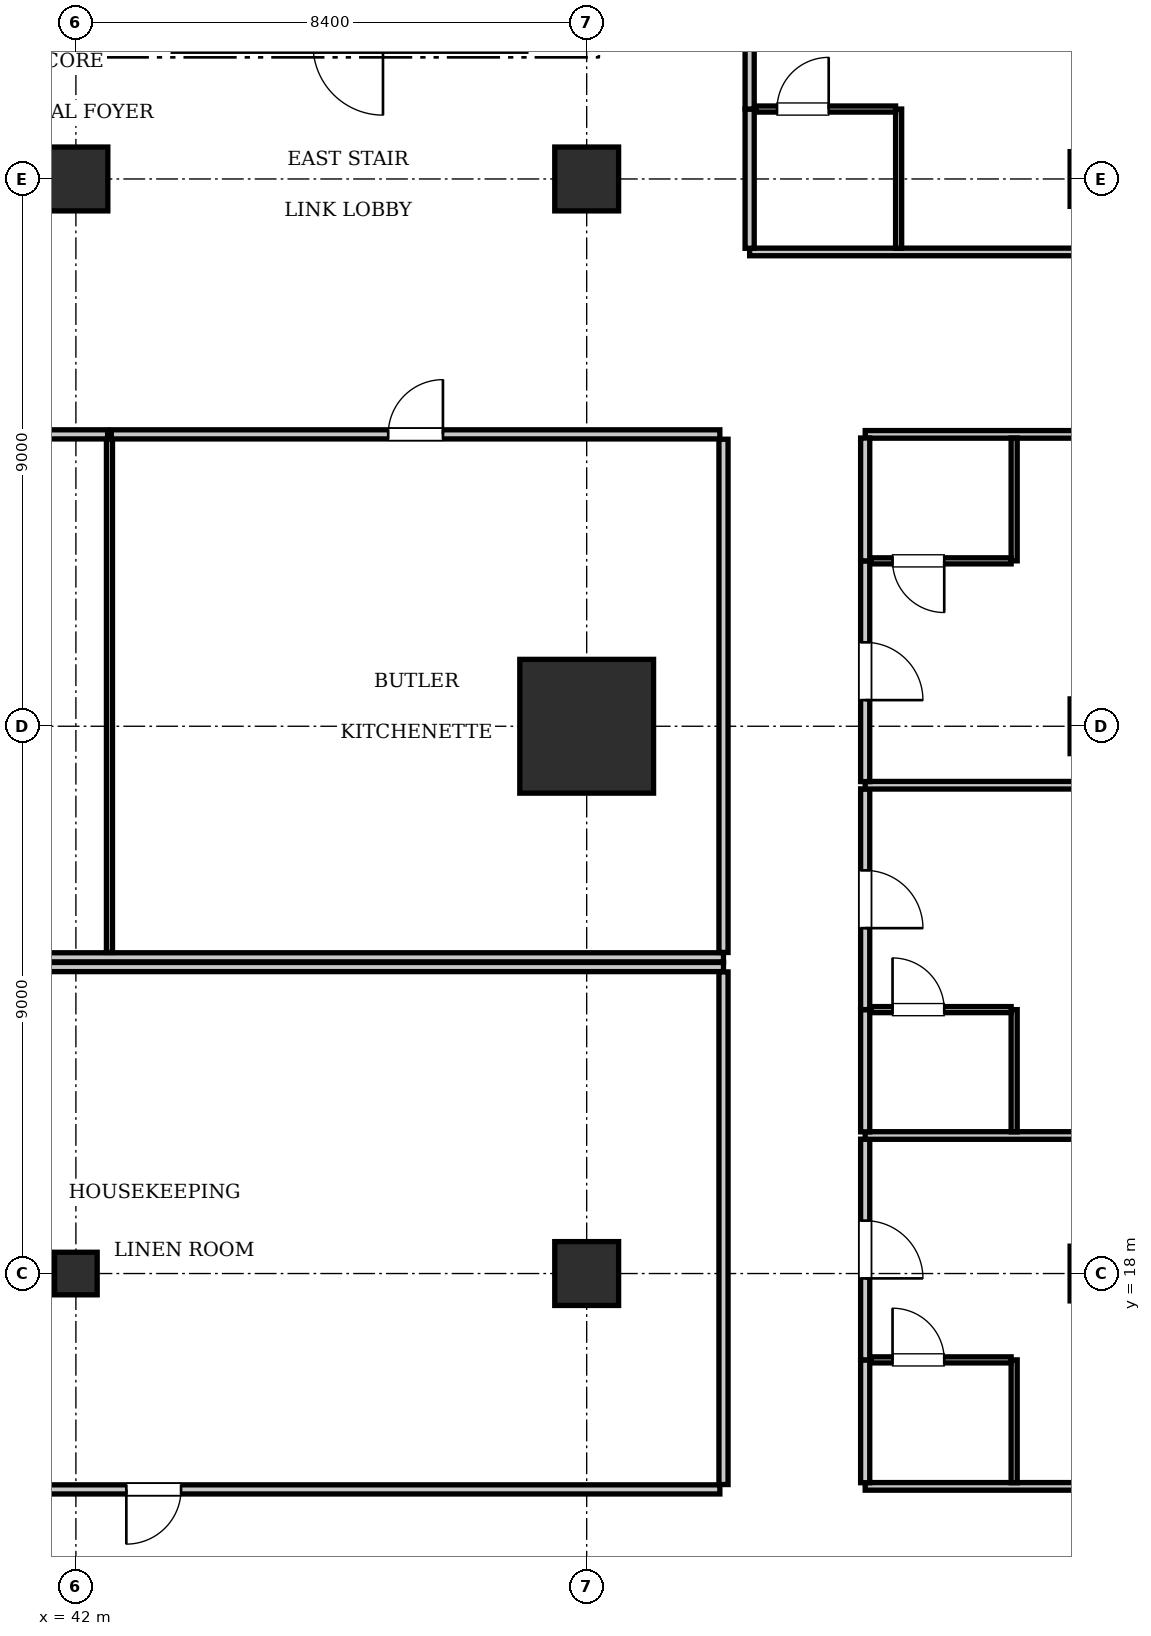
"""IFC4 building model, lengths in metres.
Left out: names, types, materials, properties, quantities, classifications, styles, units other than length and angle.
Written with IfcOpenShell. Run it as: python <this file> out.ifc"""

import sys

from ifc_helpers import new_model, si_unit, direction, frame, frame_2d, origin, origin_2d, place, context, subcontext, project, spatial, rectangle, i_section, extrude, element, fill, save


model = new_model("IFC4")
c1 = context("Model", 3, precision=1e-05, world=origin(), true_north=direction((0.0, 1.0)))
c2 = subcontext(c1, "Body", "Model", "MODEL_VIEW")
j1 = project(units=[si_unit("LENGTHUNIT", "METRE"), si_unit("PLANEANGLEUNIT", "RADIAN")], contexts=[c1])
p1 = place(None, origin())
s1 = spatial("IfcSite", under=j1, at=p1, CompositionType="ELEMENT")
p2 = place(p1, origin())
s2 = spatial("IfcBuilding", under=s1, at=p2, CompositionType="ELEMENT")
p3 = place(p2, frame((0.0, 0.0, 88.55)))
s3 = spatial("IfcBuildingStorey", under=s2, at=p3, CompositionType="ELEMENT", Elevation=88.55)
p4 = place(p3, frame((50.4, 27.0, 0.0), z_axis=(0.0, 0.0, 1.0), x_axis=(1.0, 0.0, 0.0)))
e1 = element("IfcColumn", 1, at=p4, inside=s3, PredefinedType="COLUMN", context=c2, shape_type="SweptSolid", body=[
    extrude(rectangle(XDim=2.2, YDim=2.2, at=origin_2d()), origin(), (0.0, 0.0, 1.0), 3.85),
])
for number, where, z_axis, x_axis in (
    (2, (42.0, 36.0, 0.0), (0.0, 0.0, 1.0), (1.0, 0.0, 0.0)),
    (3, (50.4, 36.0, 0.0), (0.0, 0.0, 1.0), (1.0, 0.0, 0.0)),
    (4, (50.4, 18.0, 0.0), (0.0, 0.0, 1.0), (1.0, 0.0, 0.0)),
):
    element("IfcColumn", number, at=place(p3, frame(where, z_axis=z_axis, x_axis=x_axis)), inside=s3, PredefinedType="COLUMN", context=c2, shape_type="SweptSolid", body=[
        extrude(rectangle(XDim=1.05, YDim=1.05, at=origin_2d()), origin(), (0.0, 0.0, 1.0), 3.85),
    ])
p5 = place(p3, frame((42.0, 18.0, 0.0), z_axis=(0.0, 0.0, 1.0), x_axis=(1.0, 0.0, 0.0)))
e5 = element("IfcColumn", 5, at=p5, inside=s3, PredefinedType="COLUMN", context=c2, shape_type="SweptSolid", body=[
    extrude(i_section(OverallWidth=0.7, OverallDepth=0.7, WebThickness=0.028, FlangeThickness=0.044, at=origin_2d()), origin(), (0.0, 0.0, 1.0), 3.85),
])
for number, where, z_axis, x_axis in (
    (6, (58.8, 18.0, 0.0), (0.0, 0.0, 1.0), (1.0, 0.0, 0.0)),
    (7, (58.8, 27.0, 0.0), (0.0, 0.0, 1.0), (1.0, 0.0, 0.0)),
    (8, (58.8, 36.0, 0.0), (0.0, 0.0, 1.0), (1.0, 0.0, 0.0)),
):
    element("IfcColumn", number, at=place(p3, frame(where, z_axis=z_axis, x_axis=x_axis)), inside=s3, PredefinedType="COLUMN", context=c2, shape_type="SweptSolid", body=[
        extrude(rectangle(XDim=0.9, YDim=0.9, at=origin_2d()), origin(), (0.0, 0.0, 1.0), 3.85),
    ])
p6 = place(p3, frame((22.95, 23.2, 0.0), z_axis=(0.0, 0.0, 1.0), x_axis=(1.0, 0.0, 0.0)))
e9 = element("IfcWall", 9, at=p6, inside=s3, PredefinedType="PARTITIONING", context=c2, shape_type="SweptSolid", body=[
    extrude(rectangle(XDim=29.7, YDim=0.15, at=frame_2d((14.85, 0.0))), origin(), (0.0, 0.0, 1.0), 3.61),
])
p7 = place(p3, frame((52.65, 23.28, 0.0), z_axis=(0.0, 0.0, 1.0), x_axis=(0.0, 1.0, 0.0)))
e10 = element("IfcWall", 10, at=p7, inside=s3, PredefinedType="PARTITIONING", context=c2, shape_type="SweptSolid", body=[
    extrude(rectangle(XDim=8.44, YDim=0.15, at=frame_2d((4.22, 0.0))), origin(), (0.0, 0.0, 1.0), 3.61),
])
p8 = place(p3, frame((34.266, 31.8, 0.0), z_axis=(0.0, 0.0, 1.0), x_axis=(1.0, 0.0, 0.0)))
e11 = element("IfcWall", 11, at=p8, inside=s3, PredefinedType="PARTITIONING", context=c2, shape_type="SweptSolid", body=[
    extrude(rectangle(XDim=8.256, YDim=0.15, at=frame_2d((4.128, 0.0))), origin(), (0.0, 0.0, 1.0), 3.61),
])
p9 = place(p8, frame((3.678, 0.0, 0.0)))
e12 = element("IfcOpeningElement", 12, at=p9, cuts=e11, PredefinedType="OPENING", context=c2, shape_type="SweptSolid", body=[
    extrude(rectangle(XDim=0.9, YDim=2.1, at=frame_2d((0.45, 1.05))), frame((0.0, 0.085, 0.0), z_axis=(0.0, -1.0, 0.0), x_axis=(1.0, 0.0, 0.0)), (0.0, 0.0, 1.0), 0.17),
])
p10 = place(p3, frame((42.552, 23.28, 0.0), z_axis=(0.0, 0.0, 1.0), x_axis=(0.0, 1.0, 0.0)))
e13 = element("IfcWall", 13, at=p10, inside=s3, PredefinedType="PARTITIONING", context=c2, shape_type="SweptSolid", body=[
    extrude(rectangle(XDim=8.44, YDim=0.1, at=frame_2d((4.22, 0.0))), origin(), (0.0, 0.0, 1.0), 3.61),
])
p11 = place(p3, frame((42.582, 31.8, 0.0), z_axis=(0.0, 0.0, 1.0), x_axis=(1.0, 0.0, 0.0)))
e14 = element("IfcWall", 14, at=p11, inside=s3, PredefinedType="PARTITIONING", context=c2, shape_type="SweptSolid", body=[
    extrude(rectangle(XDim=10.008, YDim=0.15, at=frame_2d((5.004, 0.0))), origin(), (0.0, 0.0, 1.0), 3.61),
])
p12 = place(p11, frame((4.554, 0.0, 0.0)))
e15 = element("IfcOpeningElement", 15, at=p12, cuts=e14, PredefinedType="OPENING", context=c2, shape_type="SweptSolid", body=[
    extrude(rectangle(XDim=0.9, YDim=2.1, at=frame_2d((0.45, 1.05))), frame((0.0, 0.085, 0.0), z_axis=(0.0, -1.0, 0.0), x_axis=(1.0, 0.0, 0.0)), (0.0, 0.0, 1.0), 0.17),
])
p13 = place(p3, frame((22.95, 23.04, 0.0), z_axis=(0.0, 0.0, 1.0), x_axis=(1.0, 0.0, 0.0)))
e16 = element("IfcWall", 16, at=p13, inside=s3, PredefinedType="PARTITIONING", context=c2, shape_type="SweptSolid", body=[
    extrude(rectangle(XDim=29.7, YDim=0.15, at=frame_2d((14.85, 0.0))), origin(), (0.0, 0.0, 1.0), 3.61),
])
p14 = place(p3, frame((52.65, 14.53, 0.0), z_axis=(0.0, 0.0, 1.0), x_axis=(0.0, 1.0, 0.0)))
e17 = element("IfcWall", 17, at=p14, inside=s3, PredefinedType="PARTITIONING", context=c2, shape_type="SweptSolid", body=[
    extrude(rectangle(XDim=8.43, YDim=0.15, at=frame_2d((4.215, 0.0))), origin(), (0.0, 0.0, 1.0), 3.61),
])
p15 = place(p3, frame((33.969, 14.45, 0.0), z_axis=(0.0, 0.0, 1.0), x_axis=(1.0, 0.0, 0.0)))
e18 = element("IfcWall", 18, at=p15, inside=s3, PredefinedType="PARTITIONING", context=c2, shape_type="SweptSolid", body=[
    extrude(rectangle(XDim=18.621, YDim=0.15, at=frame_2d((9.311, 0.0))), origin(), (0.0, 0.0, 1.0), 3.61),
])
p16 = place(p15, frame((8.861, 0.0, 0.0)))
e19 = element("IfcOpeningElement", 19, at=p16, cuts=e18, PredefinedType="OPENING", context=c2, shape_type="SweptSolid", body=[
    extrude(rectangle(XDim=0.9, YDim=2.1, at=frame_2d((0.45, 1.05))), frame((0.0, 0.085, 0.0), z_axis=(0.0, -1.0, 0.0), x_axis=(1.0, 0.0, 0.0)), (0.0, 0.0, 1.0), 0.17),
])
for number, where, z_axis, x_axis in (
    (20, (54.98, 14.5, 0.0), (0.0, 0.0, 1.0), (1.0, 0.0, 0.0)),
    (21, (54.98, 31.8, 0.0), (0.0, 0.0, 1.0), (1.0, 0.0, 0.0)),
):
    element("IfcWall", number, at=place(p3, frame(where, z_axis=z_axis, x_axis=x_axis)), inside=s3, PredefinedType="PARTITIONING", context=c2, shape_type="SweptSolid", body=[
        extrude(rectangle(XDim=9.72, YDim=0.125, at=frame_2d((4.86, 0.0))), origin(), (0.0, 0.0, 1.0), 3.61),
    ])
p17 = place(p3, frame((54.98, 14.56, 0.0), z_axis=(0.0, 0.0, 1.0), x_axis=(0.0, 1.0, 0.0)))
e22 = element("IfcWall", 22, at=p17, inside=s3, PredefinedType="PARTITIONING", context=c2, shape_type="SweptSolid", body=[
    extrude(rectangle(XDim=2.02, YDim=0.15, at=frame_2d((1.01, 0.0))), origin(), (0.0, 0.0, 1.0), 3.61),
])
p18 = place(p3, frame((54.98, 16.58, 0.0), z_axis=(0.0, 0.0, 1.0), x_axis=(0.0, 1.0, 0.0)))
e23 = element("IfcWall", 23, at=p18, inside=s3, PredefinedType="PARTITIONING", context=c2, shape_type="SweptSolid", body=[
    extrude(rectangle(XDim=3.63, YDim=0.15, at=frame_2d((1.815, 0.0))), origin(), (0.0, 0.0, 1.0), 3.61),
])
p19 = place(p18, frame((1.34, 0.0, 0.0)))
e24 = element("IfcOpeningElement", 24, at=p19, cuts=e23, PredefinedType="OPENING", context=c2, shape_type="SweptSolid", body=[
    extrude(rectangle(XDim=0.95, YDim=2.15, at=frame_2d((0.475, 1.075))), frame((0.0, 0.085, 0.0), z_axis=(0.0, -1.0, 0.0), x_axis=(1.0, 0.0, 0.0)), (0.0, 0.0, 1.0), 0.17),
])
p20 = place(p3, frame((57.43, 14.56, 0.0), z_axis=(0.0, 0.0, 1.0), x_axis=(0.0, 1.0, 0.0)))
e25 = element("IfcWall", 25, at=p20, inside=s3, PredefinedType="PARTITIONING", context=c2, shape_type="SweptSolid", body=[
    extrude(rectangle(XDim=2.02, YDim=0.1, at=frame_2d((1.01, 0.0))), origin(), (0.0, 0.0, 1.0), 3.61),
])
p21 = place(p3, frame((55.08, 16.58, 0.0), z_axis=(0.0, 0.0, 1.0), x_axis=(1.0, 0.0, 0.0)))
e26 = element("IfcWall", 26, at=p21, inside=s3, PredefinedType="PARTITIONING", context=c2, shape_type="SweptSolid", body=[
    extrude(rectangle(XDim=2.3, YDim=0.1, at=frame_2d((1.15, 0.0))), origin(), (0.0, 0.0, 1.0), 3.61),
])
p22 = place(p21, frame((0.35, 0.0, 0.0)))
e27 = element("IfcOpeningElement", 27, at=p22, cuts=e26, PredefinedType="OPENING", context=c2, shape_type="SweptSolid", body=[
    extrude(rectangle(XDim=0.85, YDim=2.1, at=frame_2d((0.425, 1.05))), frame((0.0, 0.06, 0.0), z_axis=(0.0, -1.0, 0.0), x_axis=(1.0, 0.0, 0.0)), (0.0, 0.0, 1.0), 0.12),
])
p23 = place(p3, frame((54.98, 20.27, 0.0), z_axis=(0.0, 0.0, 1.0), x_axis=(1.0, 0.0, 0.0)))
e28 = element("IfcWall", 28, at=p23, inside=s3, PredefinedType="PARTITIONING", context=c2, shape_type="SweptSolid", body=[
    extrude(rectangle(XDim=9.72, YDim=0.125, at=frame_2d((4.86, 0.0))), origin(), (0.0, 0.0, 1.0), 3.61),
])
p24 = place(p3, frame((54.98, 20.33, 0.0), z_axis=(0.0, 0.0, 1.0), x_axis=(0.0, 1.0, 0.0)))
e29 = element("IfcWall", 29, at=p24, inside=s3, PredefinedType="PARTITIONING", context=c2, shape_type="SweptSolid", body=[
    extrude(rectangle(XDim=2.01, YDim=0.15, at=frame_2d((1.005, 0.0))), origin(), (0.0, 0.0, 1.0), 3.61),
])
p25 = place(p3, frame((54.98, 22.34, 0.0), z_axis=(0.0, 0.0, 1.0), x_axis=(0.0, 1.0, 0.0)))
e30 = element("IfcWall", 30, at=p25, inside=s3, PredefinedType="PARTITIONING", context=c2, shape_type="SweptSolid", body=[
    extrude(rectangle(XDim=3.63, YDim=0.15, at=frame_2d((1.815, 0.0))), origin(), (0.0, 0.0, 1.0), 3.61),
])
p26 = place(p25, frame((1.34, 0.0, 0.0)))
e31 = element("IfcOpeningElement", 31, at=p26, cuts=e30, PredefinedType="OPENING", context=c2, shape_type="SweptSolid", body=[
    extrude(rectangle(XDim=0.95, YDim=2.15, at=frame_2d((0.475, 1.075))), frame((0.0, 0.085, 0.0), z_axis=(0.0, -1.0, 0.0), x_axis=(1.0, 0.0, 0.0)), (0.0, 0.0, 1.0), 0.17),
])
p27 = place(p3, frame((57.43, 20.33, 0.0), z_axis=(0.0, 0.0, 1.0), x_axis=(0.0, 1.0, 0.0)))
e32 = element("IfcWall", 32, at=p27, inside=s3, PredefinedType="PARTITIONING", context=c2, shape_type="SweptSolid", body=[
    extrude(rectangle(XDim=2.01, YDim=0.1, at=frame_2d((1.005, 0.0))), origin(), (0.0, 0.0, 1.0), 3.61),
])
p28 = place(p3, frame((55.08, 22.34, 0.0), z_axis=(0.0, 0.0, 1.0), x_axis=(1.0, 0.0, 0.0)))
e33 = element("IfcWall", 33, at=p28, inside=s3, PredefinedType="PARTITIONING", context=c2, shape_type="SweptSolid", body=[
    extrude(rectangle(XDim=2.3, YDim=0.1, at=frame_2d((1.15, 0.0))), origin(), (0.0, 0.0, 1.0), 3.61),
])
p29 = place(p28, frame((0.35, 0.0, 0.0)))
e34 = element("IfcOpeningElement", 34, at=p29, cuts=e33, PredefinedType="OPENING", context=c2, shape_type="SweptSolid", body=[
    extrude(rectangle(XDim=0.85, YDim=2.1, at=frame_2d((0.425, 1.05))), frame((0.0, 0.06, 0.0), z_axis=(0.0, -1.0, 0.0), x_axis=(1.0, 0.0, 0.0)), (0.0, 0.0, 1.0), 0.12),
])
p30 = place(p3, frame((54.98, 26.03, 0.0), z_axis=(0.0, 0.0, 1.0), x_axis=(1.0, 0.0, 0.0)))
e35 = element("IfcWall", 35, at=p30, inside=s3, PredefinedType="PARTITIONING", context=c2, shape_type="SweptSolid", body=[
    extrude(rectangle(XDim=9.72, YDim=0.125, at=frame_2d((4.86, 0.0))), origin(), (0.0, 0.0, 1.0), 3.61),
])
p31 = place(p3, frame((54.98, 26.09, 0.0), z_axis=(0.0, 0.0, 1.0), x_axis=(0.0, 1.0, 0.0)))
e36 = element("IfcWall", 36, at=p31, inside=s3, PredefinedType="PARTITIONING", context=c2, shape_type="SweptSolid", body=[
    extrude(rectangle(XDim=3.63, YDim=0.15, at=frame_2d((1.815, 0.0))), origin(), (0.0, 0.0, 1.0), 3.61),
])
p32 = place(p31, frame((1.34, 0.0, 0.0)))
e37 = element("IfcOpeningElement", 37, at=p32, cuts=e36, PredefinedType="OPENING", context=c2, shape_type="SweptSolid", body=[
    extrude(rectangle(XDim=0.95, YDim=2.15, at=frame_2d((0.475, 1.075))), frame((0.0, 0.085, 0.0), z_axis=(0.0, -1.0, 0.0), x_axis=(1.0, 0.0, 0.0)), (0.0, 0.0, 1.0), 0.17),
])
p33 = place(p3, frame((54.98, 29.72, 0.0), z_axis=(0.0, 0.0, 1.0), x_axis=(0.0, 1.0, 0.0)))
e38 = element("IfcWall", 38, at=p33, inside=s3, PredefinedType="PARTITIONING", context=c2, shape_type="SweptSolid", body=[
    extrude(rectangle(XDim=2.02, YDim=0.15, at=frame_2d((1.01, 0.0))), origin(), (0.0, 0.0, 1.0), 3.61),
])
p34 = place(p3, frame((57.43, 29.72, 0.0), z_axis=(0.0, 0.0, 1.0), x_axis=(0.0, 1.0, 0.0)))
e39 = element("IfcWall", 39, at=p34, inside=s3, PredefinedType="PARTITIONING", context=c2, shape_type="SweptSolid", body=[
    extrude(rectangle(XDim=2.02, YDim=0.1, at=frame_2d((1.01, 0.0))), origin(), (0.0, 0.0, 1.0), 3.61),
])
p35 = place(p3, frame((55.08, 29.72, 0.0), z_axis=(0.0, 0.0, 1.0), x_axis=(1.0, 0.0, 0.0)))
e40 = element("IfcWall", 40, at=p35, inside=s3, PredefinedType="PARTITIONING", context=c2, shape_type="SweptSolid", body=[
    extrude(rectangle(XDim=2.3, YDim=0.1, at=frame_2d((1.15, 0.0))), origin(), (0.0, 0.0, 1.0), 3.61),
])
p36 = place(p35, frame((0.35, 0.0, 0.0)))
e41 = element("IfcOpeningElement", 41, at=p36, cuts=e40, PredefinedType="OPENING", context=c2, shape_type="SweptSolid", body=[
    extrude(rectangle(XDim=0.85, YDim=2.1, at=frame_2d((0.425, 1.05))), frame((0.0, 0.06, 0.0), z_axis=(0.0, -1.0, 0.0), x_axis=(1.0, 0.0, 0.0)), (0.0, 0.0, 1.0), 0.12),
])
p37 = place(p3, frame((53.08, 34.8, 0.0), z_axis=(0.0, 0.0, 1.0), x_axis=(1.0, 0.0, 0.0)))
e42 = element("IfcWall", 42, at=p37, inside=s3, PredefinedType="PARTITIONING", context=c2, shape_type="SweptSolid", body=[
    extrude(rectangle(XDim=11.62, YDim=0.125, at=frame_2d((5.81, 0.0))), origin(), (0.0, 0.0, 1.0), 3.61),
])
p38 = place(p3, frame((53.08, 34.86, 0.0), z_axis=(0.0, 0.0, 1.0), x_axis=(0.0, 1.0, 0.0)))
e43 = element("IfcWall", 43, at=p38, inside=s3, PredefinedType="PARTITIONING", context=c2, shape_type="SweptSolid", body=[
    extrude(rectangle(XDim=2.29, YDim=0.15, at=frame_2d((1.145, 0.0))), origin(), (0.0, 0.0, 1.0), 3.61),
])
p39 = place(p3, frame((53.08, 37.15, 0.0), z_axis=(0.0, 0.0, 1.0), x_axis=(0.0, 1.0, 0.0)))
e44 = element("IfcWall", 44, at=p39, inside=s3, PredefinedType="PARTITIONING", context=c2, shape_type="SweptSolid", body=[
    extrude(rectangle(XDim=5.359, YDim=0.15, at=frame_2d((2.679, 0.0))), origin(), (0.0, 0.0, 1.0), 3.61),
])
p40 = place(p39, frame((2.204, 0.0, 0.0)))
e45 = element("IfcOpeningElement", 45, at=p40, cuts=e44, PredefinedType="OPENING", context=c2, shape_type="SweptSolid", body=[
    extrude(rectangle(XDim=0.95, YDim=2.15, at=frame_2d((0.475, 1.075))), frame((0.0, 0.085, 0.0), z_axis=(0.0, -1.0, 0.0), x_axis=(1.0, 0.0, 0.0)), (0.0, 0.0, 1.0), 0.17),
])
p41 = place(p3, frame((55.53, 34.86, 0.0), z_axis=(0.0, 0.0, 1.0), x_axis=(0.0, 1.0, 0.0)))
e46 = element("IfcWall", 46, at=p41, inside=s3, PredefinedType="PARTITIONING", context=c2, shape_type="SweptSolid", body=[
    extrude(rectangle(XDim=2.29, YDim=0.1, at=frame_2d((1.145, 0.0))), origin(), (0.0, 0.0, 1.0), 3.61),
])
p42 = place(p3, frame((53.18, 37.15, 0.0), z_axis=(0.0, 0.0, 1.0), x_axis=(1.0, 0.0, 0.0)))
e47 = element("IfcWall", 47, at=p42, inside=s3, PredefinedType="PARTITIONING", context=c2, shape_type="SweptSolid", body=[
    extrude(rectangle(XDim=2.3, YDim=0.1, at=frame_2d((1.15, 0.0))), origin(), (0.0, 0.0, 1.0), 3.61),
])
p43 = place(p42, frame((0.35, 0.0, 0.0)))
e48 = element("IfcOpeningElement", 48, at=p43, cuts=e47, PredefinedType="OPENING", context=c2, shape_type="SweptSolid", body=[
    extrude(rectangle(XDim=0.85, YDim=2.1, at=frame_2d((0.425, 1.05))), frame((0.0, 0.06, 0.0), z_axis=(0.0, -1.0, 0.0), x_axis=(1.0, 0.0, 0.0)), (0.0, 0.0, 1.0), 0.12),
])
p44 = place(p12, origin())
e49 = element("IfcDoor", 49, at=p44, inside=s3, OperationType="SINGLE_SWING_RIGHT", PredefinedType="DOOR", context=c2, shape_type="SweptSolid", body=[
    extrude(rectangle(XDim=0.9, YDim=2.1, at=frame_2d((0.45, 1.05))), frame((0.0, 0.025, 0.0), z_axis=(0.0, -1.0, 0.0), x_axis=(1.0, 0.0, 0.0)), (0.0, 0.0, 1.0), 0.05),
])
fill(e15, e49)
p45 = place(p16, frame((0.9, 0.0, 0.0), z_axis=(0.0, 0.0, 1.0), x_axis=(-1.0, 0.0, 0.0)))
e50 = element("IfcDoor", 50, at=p45, inside=s3, OperationType="SINGLE_SWING_RIGHT", PredefinedType="DOOR", context=c2, shape_type="SweptSolid", body=[
    extrude(rectangle(XDim=0.9, YDim=2.1, at=frame_2d((0.45, 1.05))), frame((0.0, 0.025, 0.0), z_axis=(0.0, -1.0, 0.0), x_axis=(1.0, 0.0, 0.0)), (0.0, 0.0, 1.0), 0.05),
])
fill(e19, e50)
p46 = place(p22, origin())
e51 = element("IfcDoor", 51, at=p46, inside=s3, OperationType="SINGLE_SWING_LEFT", PredefinedType="DOOR", context=c2, shape_type="SweptSolid", body=[
    extrude(rectangle(XDim=0.85, YDim=2.1, at=frame_2d((0.425, 1.05))), frame((0.0, 0.025, 0.0), z_axis=(0.0, -1.0, 0.0), x_axis=(1.0, 0.0, 0.0)), (0.0, 0.0, 1.0), 0.05),
])
fill(e27, e51)
p47 = place(p19, frame((0.95, 0.0, 0.0), z_axis=(0.0, 0.0, 1.0), x_axis=(-1.0, 0.0, 0.0)))
e52 = element("IfcDoor", 52, at=p47, inside=s3, OperationType="SINGLE_SWING_RIGHT", PredefinedType="DOOR", context=c2, shape_type="SweptSolid", body=[
    extrude(rectangle(XDim=0.95, YDim=2.15, at=frame_2d((0.475, 1.075))), frame((0.0, 0.025, 0.0), z_axis=(0.0, -1.0, 0.0), x_axis=(1.0, 0.0, 0.0)), (0.0, 0.0, 1.0), 0.05),
])
fill(e24, e52)
p48 = place(p29, origin())
e53 = element("IfcDoor", 53, at=p48, inside=s3, OperationType="SINGLE_SWING_LEFT", PredefinedType="DOOR", context=c2, shape_type="SweptSolid", body=[
    extrude(rectangle(XDim=0.85, YDim=2.1, at=frame_2d((0.425, 1.05))), frame((0.0, 0.025, 0.0), z_axis=(0.0, -1.0, 0.0), x_axis=(1.0, 0.0, 0.0)), (0.0, 0.0, 1.0), 0.05),
])
fill(e34, e53)
p49 = place(p26, frame((0.95, 0.0, 0.0), z_axis=(0.0, 0.0, 1.0), x_axis=(-1.0, 0.0, 0.0)))
e54 = element("IfcDoor", 54, at=p49, inside=s3, OperationType="SINGLE_SWING_RIGHT", PredefinedType="DOOR", context=c2, shape_type="SweptSolid", body=[
    extrude(rectangle(XDim=0.95, YDim=2.15, at=frame_2d((0.475, 1.075))), frame((0.0, 0.025, 0.0), z_axis=(0.0, -1.0, 0.0), x_axis=(1.0, 0.0, 0.0)), (0.0, 0.0, 1.0), 0.05),
])
fill(e31, e54)
p50 = place(p36, frame((0.85, 0.0, 0.0), z_axis=(0.0, 0.0, 1.0), x_axis=(-1.0, 0.0, 0.0)))
e55 = element("IfcDoor", 55, at=p50, inside=s3, OperationType="SINGLE_SWING_LEFT", PredefinedType="DOOR", context=c2, shape_type="SweptSolid", body=[
    extrude(rectangle(XDim=0.85, YDim=2.1, at=frame_2d((0.425, 1.05))), frame((0.0, 0.025, 0.0), z_axis=(0.0, -1.0, 0.0), x_axis=(1.0, 0.0, 0.0)), (0.0, 0.0, 1.0), 0.05),
])
fill(e41, e55)
p51 = place(p32, frame((0.95, 0.0, 0.0), z_axis=(0.0, 0.0, 1.0), x_axis=(-1.0, 0.0, 0.0)))
e56 = element("IfcDoor", 56, at=p51, inside=s3, OperationType="SINGLE_SWING_RIGHT", PredefinedType="DOOR", context=c2, shape_type="SweptSolid", body=[
    extrude(rectangle(XDim=0.95, YDim=2.15, at=frame_2d((0.475, 1.075))), frame((0.0, 0.025, 0.0), z_axis=(0.0, -1.0, 0.0), x_axis=(1.0, 0.0, 0.0)), (0.0, 0.0, 1.0), 0.05),
])
fill(e37, e56)
p52 = place(p43, origin())
e57 = element("IfcDoor", 57, at=p52, inside=s3, OperationType="SINGLE_SWING_RIGHT", PredefinedType="DOOR", context=c2, shape_type="SweptSolid", body=[
    extrude(rectangle(XDim=0.85, YDim=2.1, at=frame_2d((0.425, 1.05))), frame((0.0, 0.025, 0.0), z_axis=(0.0, -1.0, 0.0), x_axis=(1.0, 0.0, 0.0)), (0.0, 0.0, 1.0), 0.05),
])
fill(e48, e57)
save(model, sys.argv[1])
